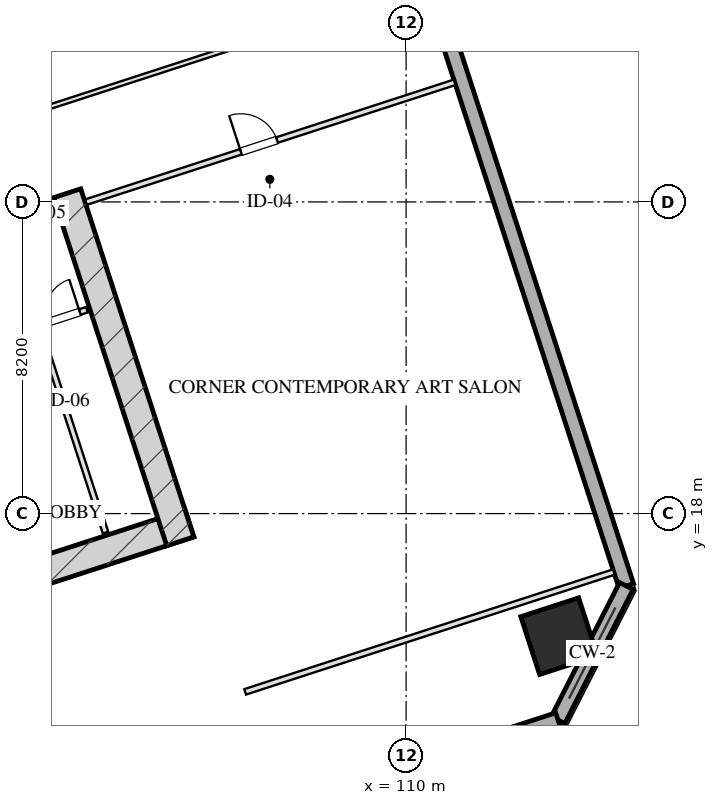
"""IFC4 building model, lengths in metres.
Left out: names, types, materials, properties, quantities, classifications, styles, units other than length and angle.
Written with IfcOpenShell. Run it as: python <this file> out.ifc"""

import sys

from ifc_helpers import new_model, si_unit, direction, frame, frame_2d, origin, origin_2d, place, context, subcontext, project, spatial, rectangle, hollow_rectangle, extrude, element, fill, save


model = new_model("IFC4")
c1 = context("Model", 3, precision=1e-05, world=origin(), true_north=direction((0.0, 1.0)))
c2 = subcontext(c1, "Body", "Model", "MODEL_VIEW")
j1 = project(units=[si_unit("LENGTHUNIT", "METRE"), si_unit("PLANEANGLEUNIT", "RADIAN")], contexts=[c1])
p1 = place(None, origin())
s1 = spatial("IfcSite", under=j1, at=p1, CompositionType="ELEMENT")
p2 = place(p1, origin())
s2 = spatial("IfcBuilding", under=s1, at=p2, CompositionType="ELEMENT")
p3 = place(p2, frame((0.0, 0.0, 54.05)))
s3 = spatial("IfcBuildingStorey", under=s2, at=p3, CompositionType="ELEMENT", Elevation=54.05)
p4 = place(p3, frame((88.559, 12.629, 0.0), z_axis=(0.0, 0.0, 1.0), x_axis=(0.951056072937, 0.309018358888, 0.0)))
e1 = element("IfcWall", 1, at=p4, inside=s3, PredefinedType="SHEAR", context=c2, shape_type="SweptSolid", body=[
    extrude(rectangle(XDim=16.55, YDim=0.75, at=frame_2d((8.275, 0.0))), origin(), (0.0, 0.0, 1.0), 3.45),
])
p5 = place(p3, frame((101.082, 26.429, 0.0), z_axis=(0.0, 0.0, 1.0), x_axis=(0.309016134813, -0.951056795583, 0.0)))
e2 = element("IfcWall", 2, at=p5, inside=s3, PredefinedType="SHEAR", context=c2, shape_type="SweptSolid", body=[
    extrude(rectangle(XDim=9.63, YDim=0.75, at=frame_2d((4.815, 0.0))), origin(), (0.0, 0.0, 1.0), 3.45),
])
p6 = place(p3, frame((114.027, 14.774, 0.0), z_axis=(0.0, 0.0, 1.0), x_axis=(0.951056516295, 0.309016994375, 0.0)))
e3 = element("IfcColumn", 3, at=p6, inside=s3, PredefinedType="COLUMN", context=c2, shape_type="SweptSolid", body=[
    extrude(hollow_rectangle(XDim=1.6, YDim=1.6, WallThickness=0.055, at=origin_2d()), origin(), (0.0, 0.0, 1.0), 3.451),
])
p7 = place(p3, frame((100.345, 63.648, 0.0), z_axis=(0.0, 0.0, 1.0), x_axis=(0.309014526607, -0.951057318118, 0.0)))
e4 = element("IfcWall", 4, at=p7, inside=s3, PredefinedType="SOLIDWALL", context=c2, shape_type="SweptSolid", body=[
    extrude(rectangle(XDim=50.0, YDim=0.4, at=frame_2d((25.0, 0.0))), origin(), (0.0, 0.0, 1.0), 2.61),
])
p8 = place(p3, frame((115.795, 16.095, 0.0), z_axis=(0.0, 0.0, 1.0), x_axis=(-0.453958106755, -0.891023028497, 0.0)))
e5 = element("IfcWall", 5, at=p8, inside=s3, PredefinedType="SOLIDWALL", context=c2, shape_type="SweptSolid", body=[
    extrude(rectangle(XDim=3.96, YDim=0.4, at=frame_2d((1.98, 0.0))), origin(), (0.0, 0.0, 1.0), 2.61),
])
p9 = place(p3, frame((113.998, 12.567, 0.0), z_axis=(0.0, 0.0, 1.0), x_axis=(-0.951055939317, -0.309018770125, 0.0)))
e6 = element("IfcWall", 6, at=p9, inside=s3, PredefinedType="SOLIDWALL", context=c2, shape_type="SweptSolid", body=[
    extrude(rectangle(XDim=32.4, YDim=0.4, at=frame_2d((16.2, 0.0))), origin(), (0.0, 0.0, 1.0), 2.61),
])
p10 = place(p3, frame((97.727, 24.944, 0.0), z_axis=(0.0, 0.0, 1.0), x_axis=(0.951036872128, 0.309077446369, 0.0)))
e7 = element("IfcWall", 7, at=p10, inside=s3, PredefinedType="PARTITIONING", context=c2, shape_type="SweptSolid", body=[
    extrude(rectangle(XDim=3.2, YDim=0.15, at=frame_2d((1.6, 0.0))), origin(), (0.0, 0.0, 1.0), 3.175),
])
p11 = place(p10, frame((0.45, 0.0, 0.0)))
e8 = element("IfcOpeningElement", 8, at=p11, cuts=e7, PredefinedType="OPENING", context=c2, shape_type="SweptSolid", body=[
    extrude(rectangle(XDim=0.95, YDim=2.05, at=frame_2d((0.475, 1.025))), frame((0.0, 0.085, 0.0), z_axis=(0.0, -1.0, 0.0), x_axis=(1.0, 0.0, 0.0)), (0.0, 0.0, 1.0), 0.17),
])
p12 = place(p3, frame((98.561, 22.376, 0.0), z_axis=(0.0, 0.0, 1.0), x_axis=(0.95104415986, 0.309055020985, 0.0)))
e9 = element("IfcWall", 9, at=p12, inside=s3, PredefinedType="PARTITIONING", context=c2, shape_type="SweptSolid", body=[
    extrude(rectangle(XDim=3.2, YDim=0.15, at=frame_2d((1.6, 0.0))), origin(), (0.0, 0.0, 1.0), 3.175),
])
p13 = place(p12, frame((0.35, 0.0, 0.0)))
e10 = element("IfcOpeningElement", 10, at=p13, cuts=e9, PredefinedType="OPENING", context=c2, shape_type="SweptSolid", body=[
    extrude(rectangle(XDim=0.9, YDim=2.05, at=frame_2d((0.45, 1.025))), frame((0.0, 0.085, 0.0), z_axis=(0.0, -1.0, 0.0), x_axis=(1.0, 0.0, 0.0)), (0.0, 0.0, 1.0), 0.17),
])
p14 = place(p12, frame((2.1, 0.0, 0.0)))
e11 = element("IfcOpeningElement", 11, at=p14, cuts=e9, PredefinedType="OPENING", context=c2, shape_type="SweptSolid", body=[
    extrude(rectangle(XDim=0.9, YDim=2.05, at=frame_2d((0.45, 1.025))), frame((0.0, 0.085, 0.0), z_axis=(0.0, -1.0, 0.0), x_axis=(1.0, 0.0, 0.0)), (0.0, 0.0, 1.0), 0.17),
])
p15 = place(p3, frame((100.32, 22.948, 0.0), z_axis=(0.0, 0.0, 1.0), x_axis=(0.309035009867, -0.951050662518, 0.0)))
e12 = element("IfcWall", 12, at=p15, inside=s3, PredefinedType="PARTITIONING", context=c2, shape_type="SweptSolid", body=[
    extrude(rectangle(XDim=5.73, YDim=0.15, at=frame_2d((2.865, 0.0))), origin(), (0.0, 0.0, 1.0), 3.175),
])
p16 = place(p3, frame((105.765, 13.309, 0.0), z_axis=(0.0, 0.0, 1.0), x_axis=(0.951054294345, 0.309023832749, 0.0)))
e13 = element("IfcWall", 13, at=p16, inside=s3, PredefinedType="PARTITIONING", context=c2, shape_type="SweptSolid", body=[
    extrude(rectangle(XDim=10.2, YDim=0.15, at=frame_2d((5.1, 0.0))), origin(), (0.0, 0.0, 1.0), 3.175),
])
p17 = place(p3, frame((101.578, 26.196, 0.0), z_axis=(0.0, 0.0, 1.0), x_axis=(0.951059043131, 0.309009217467, 0.0)))
e14 = element("IfcWall", 14, at=p17, inside=s3, PredefinedType="PARTITIONING", context=c2, shape_type="SweptSolid", body=[
    extrude(rectangle(XDim=10.2, YDim=0.15, at=frame_2d((5.1, 0.0))), origin(), (0.0, 0.0, 1.0), 3.175),
])
p18 = place(p17, frame((4.284, 0.0, 0.0)))
e15 = element("IfcOpeningElement", 15, at=p18, cuts=e14, PredefinedType="OPENING", context=c2, shape_type="SweptSolid", body=[
    extrude(rectangle(XDim=1.0, YDim=2.05, at=frame_2d((0.5, 1.025))), frame((0.0, 0.085, 0.0), z_axis=(0.0, -1.0, 0.0), x_axis=(1.0, 0.0, 0.0)), (0.0, 0.0, 1.0), 0.17),
])
for number, where, z_axis, x_axis in (
    (16, (93.546, 26.404, 0.0), (0.0, 0.0, 1.0), (0.951, 0.309, 0.0)),
    (17, (92.52, 29.562, 0.0), (0.0, 0.0, 1.0), (0.951, 0.309, 0.0)),
):
    element("IfcWall", number, at=place(p3, frame(where, z_axis=z_axis, x_axis=x_axis)), inside=s3, PredefinedType="PARTITIONING", context=c2, shape_type="SweptSolid", body=[
        extrude(rectangle(XDim=17.775, YDim=0.12, at=frame_2d((8.887, 0.0))), origin(), (0.0, 0.0, 1.0), 3.175),
    ])
p19 = place(p14, origin())
e18 = element("IfcDoor", 18, at=p19, inside=s3, OperationType="SINGLE_SWING_RIGHT", PredefinedType="DOOR", context=c2, shape_type="SweptSolid", body=[
    extrude(rectangle(XDim=0.9, YDim=2.05, at=frame_2d((0.45, 1.025))), frame((0.0, 0.025, 0.0), z_axis=(0.0, -1.0, 0.0), x_axis=(1.0, 0.0, 0.0)), (0.0, 0.0, 1.0), 0.05),
])
fill(e11, e18)
p20 = place(p18, origin())
e19 = element("IfcDoor", 19, at=p20, inside=s3, OperationType="SINGLE_SWING_LEFT", PredefinedType="DOOR", context=c2, shape_type="SweptSolid", body=[
    extrude(rectangle(XDim=1.0, YDim=2.05, at=frame_2d((0.5, 1.025))), frame((0.0, 0.025, 0.0), z_axis=(0.0, -1.0, 0.0), x_axis=(1.0, 0.0, 0.0)), (0.0, 0.0, 1.0), 0.05),
])
fill(e15, e19)
save(model, sys.argv[1])
